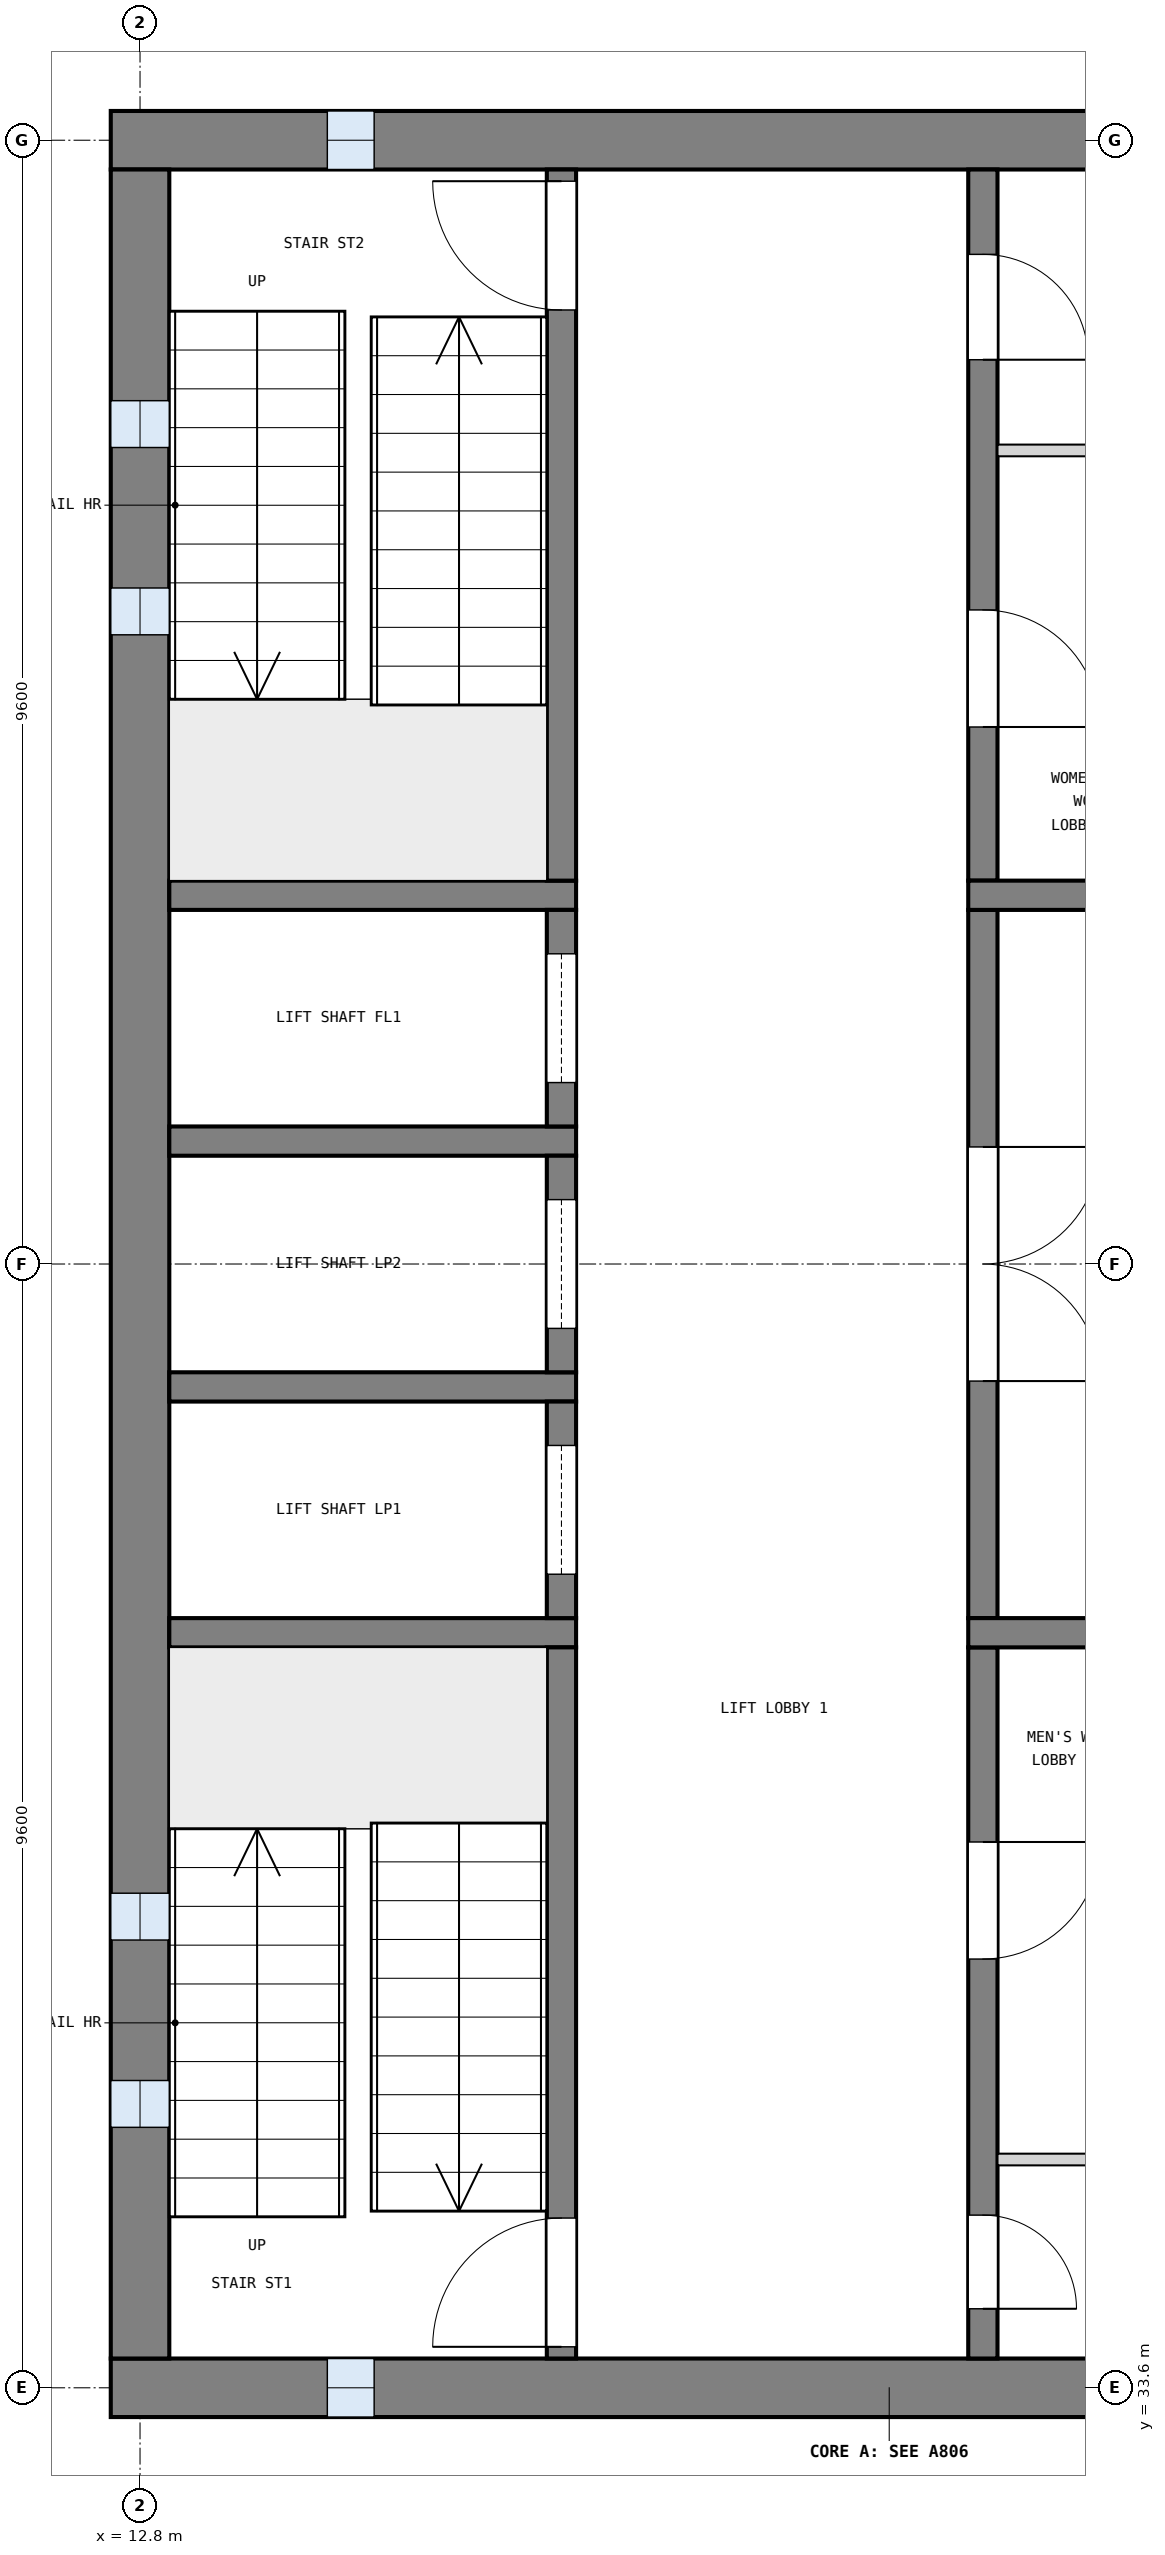
"""IFC4 building model, lengths in metres.
Left out: names, types, materials, properties, quantities, classifications, styles, units other than length and angle.
Written with IfcOpenShell. Run it as: python <this file> out.ifc"""

import sys

from ifc_helpers import new_model, si_unit, direction, frame, frame_2d, origin, place, context, subcontext, project, spatial, rectangle, extrude, element, fill, save


model = new_model("IFC4")
c1 = context("Model", 3, precision=1e-05, world=origin(), true_north=direction((0.0, 1.0)))
c2 = subcontext(c1, "Body", "Model", "MODEL_VIEW")
j1 = project(units=[si_unit("LENGTHUNIT", "METRE"), si_unit("PLANEANGLEUNIT", "RADIAN")], contexts=[c1])
p1 = place(None, origin())
s1 = spatial("IfcSite", under=j1, at=p1, CompositionType="ELEMENT")
p2 = place(p1, origin())
s2 = spatial("IfcBuilding", under=s1, at=p2, CompositionType="ELEMENT")
p3 = place(p2, frame((0.0, 0.0, 17.1)))
s3 = spatial("IfcBuildingStorey", under=s2, at=p3, CompositionType="ELEMENT", Elevation=17.1)
p4 = place(p3, frame((12.55, 52.8, 0.0), z_axis=(0.0, 0.0, 1.0), x_axis=(1.0, 0.0, 0.0)))
e1 = element("IfcWall", 1, at=p4, inside=s3, PredefinedType="SHEAR", context=c2, shape_type="SweptSolid", body=[
    extrude(rectangle(XDim=13.3, YDim=0.5, at=frame_2d((6.65, 0.0))), origin(), (0.0, 0.0, 1.0), 3.9),
])
p5 = place(p4, frame((1.85, 0.0, 1.0)))
e2 = element("IfcOpeningElement", 2, at=p5, cuts=e1, PredefinedType="OPENING", context=c2, shape_type="SweptSolid", body=[
    extrude(rectangle(XDim=0.4, YDim=2.0, at=frame_2d((0.2, 1.0))), frame((0.0, 0.26, 0.0), z_axis=(0.0, -1.0, 0.0), x_axis=(1.0, 0.0, 0.0)), (0.0, 0.0, 1.0), 0.52),
])
p6 = place(p3, frame((12.55, 33.6, 0.0), z_axis=(0.0, 0.0, 1.0), x_axis=(1.0, 0.0, 0.0)))
e3 = element("IfcWall", 3, at=p6, inside=s3, PredefinedType="SHEAR", context=c2, shape_type="SweptSolid", body=[
    extrude(rectangle(XDim=13.3, YDim=0.5, at=frame_2d((6.65, 0.0))), origin(), (0.0, 0.0, 1.0), 3.9),
])
p7 = place(p6, frame((1.85, 0.0, 1.0)))
e4 = element("IfcOpeningElement", 4, at=p7, cuts=e3, PredefinedType="OPENING", context=c2, shape_type="SweptSolid", body=[
    extrude(rectangle(XDim=0.4, YDim=2.0, at=frame_2d((0.2, 1.0))), frame((0.0, 0.26, 0.0), z_axis=(0.0, -1.0, 0.0), x_axis=(1.0, 0.0, 0.0)), (0.0, 0.0, 1.0), 0.52),
])
p8 = place(p3, frame((12.8, 33.85, 0.0), z_axis=(0.0, 0.0, 1.0), x_axis=(0.0, 1.0, 0.0)))
e5 = element("IfcWall", 5, at=p8, inside=s3, PredefinedType="SHEAR", context=c2, shape_type="SweptSolid", body=[
    extrude(rectangle(XDim=18.7, YDim=0.5, at=frame_2d((9.35, 0.0))), origin(), (0.0, 0.0, 1.0), 3.9),
])
p9 = place(p8, frame((1.975, 0.0, 1.0)))
e6 = element("IfcOpeningElement", 6, at=p9, cuts=e5, PredefinedType="OPENING", context=c2, shape_type="SweptSolid", body=[
    extrude(rectangle(XDim=0.4, YDim=2.0, at=frame_2d((0.2, 1.0))), frame((0.0, 0.26, 0.0), z_axis=(0.0, -1.0, 0.0), x_axis=(1.0, 0.0, 0.0)), (0.0, 0.0, 1.0), 0.52),
])
p10 = place(p8, frame((3.575, 0.0, 1.0)))
e7 = element("IfcOpeningElement", 7, at=p10, cuts=e5, PredefinedType="OPENING", context=c2, shape_type="SweptSolid", body=[
    extrude(rectangle(XDim=0.4, YDim=2.0, at=frame_2d((0.2, 1.0))), frame((0.0, 0.26, 0.0), z_axis=(0.0, -1.0, 0.0), x_axis=(1.0, 0.0, 0.0)), (0.0, 0.0, 1.0), 0.52),
])
p11 = place(p8, frame((14.725, 0.0, 1.0)))
e8 = element("IfcOpeningElement", 8, at=p11, cuts=e5, PredefinedType="OPENING", context=c2, shape_type="SweptSolid", body=[
    extrude(rectangle(XDim=0.4, YDim=2.0, at=frame_2d((0.2, 1.0))), frame((0.0, 0.26, 0.0), z_axis=(0.0, -1.0, 0.0), x_axis=(1.0, 0.0, 0.0)), (0.0, 0.0, 1.0), 0.52),
])
p12 = place(p8, frame((16.325, 0.0, 1.0)))
e9 = element("IfcOpeningElement", 9, at=p12, cuts=e5, PredefinedType="OPENING", context=c2, shape_type="SweptSolid", body=[
    extrude(rectangle(XDim=0.4, YDim=2.0, at=frame_2d((0.2, 1.0))), frame((0.0, 0.26, 0.0), z_axis=(0.0, -1.0, 0.0), x_axis=(1.0, 0.0, 0.0)), (0.0, 0.0, 1.0), 0.52),
])
for number, where, z_axis, x_axis in (
    (10, (13.05, 40.05, 0.0), (0.0, 0.0, 1.0), (1.0, 0.0, 0.0)),
    (11, (13.05, 42.15, 0.0), (0.0, 0.0, 1.0), (1.0, 0.0, 0.0)),
    (12, (13.05, 44.25, 0.0), (0.0, 0.0, 1.0), (1.0, 0.0, 0.0)),
    (13, (13.05, 46.35, 0.0), (0.0, 0.0, 1.0), (1.0, 0.0, 0.0)),
):
    element("IfcWall", number, at=place(p3, frame(where, z_axis=z_axis, x_axis=x_axis)), inside=s3, PredefinedType="SOLIDWALL", context=c2, shape_type="SweptSolid", body=[
        extrude(rectangle(XDim=3.475, YDim=0.25, at=frame_2d((1.737, 0.0))), origin(), (0.0, 0.0, 1.0), 3.6),
    ])
p13 = place(p3, frame((16.4, 33.85, 0.0), z_axis=(0.0, 0.0, 1.0), x_axis=(0.0, 1.0, 0.0)))
e14 = element("IfcWall", 14, at=p13, inside=s3, PredefinedType="SOLIDWALL", context=c2, shape_type="SweptSolid", body=[
    extrude(rectangle(XDim=6.075, YDim=0.25, at=frame_2d((3.038, 0.0))), origin(), (0.0, 0.0, 1.0), 3.6),
])
p14 = place(p13, frame((0.1, 0.0, 0.0)))
e15 = element("IfcOpeningElement", 15, at=p14, cuts=e14, PredefinedType="OPENING", context=c2, shape_type="SweptSolid", body=[
    extrude(rectangle(XDim=1.1, YDim=2.1, at=frame_2d((0.55, 1.05))), frame((0.0, 0.135, 0.0), z_axis=(0.0, -1.0, 0.0), x_axis=(1.0, 0.0, 0.0)), (0.0, 0.0, 1.0), 0.27),
])
p15 = place(p3, frame((16.4, 40.175, 0.0), z_axis=(0.0, 0.0, 1.0), x_axis=(0.0, 1.0, 0.0)))
e16 = element("IfcWall", 16, at=p15, inside=s3, PredefinedType="SOLIDWALL", context=c2, shape_type="SweptSolid", body=[
    extrude(rectangle(XDim=1.85, YDim=0.25, at=frame_2d((0.925, 0.0))), origin(), (0.0, 0.0, 1.0), 3.6),
])
p16 = place(p15, frame((0.375, 0.0, 0.0)))
e17 = element("IfcOpeningElement", 17, at=p16, cuts=e16, PredefinedType="OPENING", context=c2, shape_type="SweptSolid", body=[
    extrude(rectangle(XDim=1.1, YDim=2.1, at=frame_2d((0.55, 1.05))), frame((0.0, 0.135, 0.0), z_axis=(0.0, -1.0, 0.0), x_axis=(1.0, 0.0, 0.0)), (0.0, 0.0, 1.0), 0.27),
])
p17 = place(p3, frame((16.4, 42.275, 0.0), z_axis=(0.0, 0.0, 1.0), x_axis=(0.0, 1.0, 0.0)))
e18 = element("IfcWall", 18, at=p17, inside=s3, PredefinedType="SOLIDWALL", context=c2, shape_type="SweptSolid", body=[
    extrude(rectangle(XDim=1.85, YDim=0.25, at=frame_2d((0.925, 0.0))), origin(), (0.0, 0.0, 1.0), 3.6),
])
p18 = place(p17, frame((0.375, 0.0, 0.0)))
e19 = element("IfcOpeningElement", 19, at=p18, cuts=e18, PredefinedType="OPENING", context=c2, shape_type="SweptSolid", body=[
    extrude(rectangle(XDim=1.1, YDim=2.1, at=frame_2d((0.55, 1.05))), frame((0.0, 0.135, 0.0), z_axis=(0.0, -1.0, 0.0), x_axis=(1.0, 0.0, 0.0)), (0.0, 0.0, 1.0), 0.27),
])
p19 = place(p3, frame((16.4, 44.375, 0.0), z_axis=(0.0, 0.0, 1.0), x_axis=(0.0, 1.0, 0.0)))
e20 = element("IfcWall", 20, at=p19, inside=s3, PredefinedType="SOLIDWALL", context=c2, shape_type="SweptSolid", body=[
    extrude(rectangle(XDim=1.85, YDim=0.25, at=frame_2d((0.925, 0.0))), origin(), (0.0, 0.0, 1.0), 3.6),
])
p20 = place(p19, frame((0.375, 0.0, 0.0)))
e21 = element("IfcOpeningElement", 21, at=p20, cuts=e20, PredefinedType="OPENING", context=c2, shape_type="SweptSolid", body=[
    extrude(rectangle(XDim=1.1, YDim=2.1, at=frame_2d((0.55, 1.05))), frame((0.0, 0.135, 0.0), z_axis=(0.0, -1.0, 0.0), x_axis=(1.0, 0.0, 0.0)), (0.0, 0.0, 1.0), 0.27),
])
p21 = place(p3, frame((16.4, 46.475, 0.0), z_axis=(0.0, 0.0, 1.0), x_axis=(0.0, 1.0, 0.0)))
e22 = element("IfcWall", 22, at=p21, inside=s3, PredefinedType="SOLIDWALL", context=c2, shape_type="SweptSolid", body=[
    extrude(rectangle(XDim=6.075, YDim=0.25, at=frame_2d((3.038, 0.0))), origin(), (0.0, 0.0, 1.0), 3.6),
])
p22 = place(p21, frame((4.875, 0.0, 0.0)))
e23 = element("IfcOpeningElement", 23, at=p22, cuts=e22, PredefinedType="OPENING", context=c2, shape_type="SweptSolid", body=[
    extrude(rectangle(XDim=1.1, YDim=2.1, at=frame_2d((0.55, 1.05))), frame((0.0, 0.135, 0.0), z_axis=(0.0, -1.0, 0.0), x_axis=(1.0, 0.0, 0.0)), (0.0, 0.0, 1.0), 0.27),
])
p23 = place(p3, frame((20.0, 33.85, 0.0), z_axis=(0.0, 0.0, 1.0), x_axis=(0.0, 1.0, 0.0)))
e24 = element("IfcWall", 24, at=p23, inside=s3, PredefinedType="SOLIDWALL", context=c2, shape_type="SweptSolid", body=[
    extrude(rectangle(XDim=6.075, YDim=0.25, at=frame_2d((3.038, 0.0))), origin(), (0.0, 0.0, 1.0), 3.6),
])
p24 = place(p23, frame((0.425, 0.0, 0.0)))
e25 = element("IfcOpeningElement", 25, at=p24, cuts=e24, PredefinedType="OPENING", context=c2, shape_type="SweptSolid", body=[
    extrude(rectangle(XDim=0.8, YDim=2.1, at=frame_2d((0.4, 1.05))), frame((0.0, 0.135, 0.0), z_axis=(0.0, -1.0, 0.0), x_axis=(1.0, 0.0, 0.0)), (0.0, 0.0, 1.0), 0.27),
])
p25 = place(p23, frame((3.413, 0.0, 0.0)))
e26 = element("IfcOpeningElement", 26, at=p25, cuts=e24, PredefinedType="OPENING", context=c2, shape_type="SweptSolid", body=[
    extrude(rectangle(XDim=1.0, YDim=2.1, at=frame_2d((0.5, 1.05))), frame((0.0, 0.135, 0.0), z_axis=(0.0, -1.0, 0.0), x_axis=(1.0, 0.0, 0.0)), (0.0, 0.0, 1.0), 0.27),
])
p26 = place(p3, frame((20.0, 40.175, 0.0), z_axis=(0.0, 0.0, 1.0), x_axis=(0.0, 1.0, 0.0)))
e27 = element("IfcWall", 27, at=p26, inside=s3, PredefinedType="SOLIDWALL", context=c2, shape_type="SweptSolid", body=[
    extrude(rectangle(XDim=6.05, YDim=0.25, at=frame_2d((3.025, 0.0))), origin(), (0.0, 0.0, 1.0), 3.6),
])
p27 = place(p26, frame((2.025, 0.0, 0.0)))
e28 = element("IfcOpeningElement", 28, at=p27, cuts=e27, PredefinedType="OPENING", context=c2, shape_type="SweptSolid", body=[
    extrude(rectangle(XDim=2.0, YDim=2.1, at=frame_2d((1.0, 1.05))), frame((0.0, 0.135, 0.0), z_axis=(0.0, -1.0, 0.0), x_axis=(1.0, 0.0, 0.0)), (0.0, 0.0, 1.0), 0.27),
])
p28 = place(p3, frame((20.0, 46.475, 0.0), z_axis=(0.0, 0.0, 1.0), x_axis=(0.0, 1.0, 0.0)))
e29 = element("IfcWall", 29, at=p28, inside=s3, PredefinedType="SOLIDWALL", context=c2, shape_type="SweptSolid", body=[
    extrude(rectangle(XDim=6.075, YDim=0.25, at=frame_2d((3.038, 0.0))), origin(), (0.0, 0.0, 1.0), 3.6),
])
p29 = place(p28, frame((1.312, 0.0, 0.0)))
e30 = element("IfcOpeningElement", 30, at=p29, cuts=e29, PredefinedType="OPENING", context=c2, shape_type="SweptSolid", body=[
    extrude(rectangle(XDim=1.0, YDim=2.1, at=frame_2d((0.5, 1.05))), frame((0.0, 0.135, 0.0), z_axis=(0.0, -1.0, 0.0), x_axis=(1.0, 0.0, 0.0)), (0.0, 0.0, 1.0), 0.27),
])
p30 = place(p28, frame((4.45, 0.0, 0.0)))
e31 = element("IfcOpeningElement", 31, at=p30, cuts=e29, PredefinedType="OPENING", context=c2, shape_type="SweptSolid", body=[
    extrude(rectangle(XDim=0.9, YDim=2.1, at=frame_2d((0.45, 1.05))), frame((0.0, 0.135, 0.0), z_axis=(0.0, -1.0, 0.0), x_axis=(1.0, 0.0, 0.0)), (0.0, 0.0, 1.0), 0.27),
])
for number, where, z_axis, x_axis in (
    (32, (19.875, 40.05, 0.0), (0.0, 0.0, 1.0), (1.0, 0.0, 0.0)),
    (33, (19.875, 46.35, 0.0), (0.0, 0.0, 1.0), (1.0, 0.0, 0.0)),
):
    element("IfcWall", number, at=place(p3, frame(where, z_axis=z_axis, x_axis=x_axis)), inside=s3, PredefinedType="SOLIDWALL", context=c2, shape_type="SweptSolid", body=[
        extrude(rectangle(XDim=5.475, YDim=0.25, at=frame_2d((2.738, 0.0))), origin(), (0.0, 0.0, 1.0), 3.6),
    ])
for number, where, z_axis, x_axis in (
    (34, (20.125, 35.55, 0.0), (0.0, 0.0, 1.0), (1.0, 0.0, 0.0)),
    (35, (20.125, 50.15, 0.0), (0.0, 0.0, 1.0), (1.0, 0.0, 0.0)),
):
    element("IfcWall", number, at=place(p3, frame(where, z_axis=z_axis, x_axis=x_axis)), inside=s3, PredefinedType="PARTITIONING", context=c2, shape_type="SweptSolid", body=[
        extrude(rectangle(XDim=5.225, YDim=0.1, at=frame_2d((2.613, 0.0))), origin(), (0.0, 0.0, 1.0), 3.6),
    ])
p31 = place(p9, origin())
e36 = element("IfcWindow", 36, at=p31, inside=s3, PartitioningType="SINGLE_PANEL", PredefinedType="WINDOW", context=c2, shape_type="SweptSolid", body=[
    extrude(rectangle(XDim=0.4, YDim=2.0, at=frame_2d((0.2, 1.0))), frame((0.0, 0.03, 0.0), z_axis=(0.0, -1.0, 0.0), x_axis=(1.0, 0.0, 0.0)), (0.0, 0.0, 1.0), 0.06),
])
fill(e6, e36)
p32 = place(p10, origin())
e37 = element("IfcWindow", 37, at=p32, inside=s3, PartitioningType="SINGLE_PANEL", PredefinedType="WINDOW", context=c2, shape_type="SweptSolid", body=[
    extrude(rectangle(XDim=0.4, YDim=2.0, at=frame_2d((0.2, 1.0))), frame((0.0, 0.03, 0.0), z_axis=(0.0, -1.0, 0.0), x_axis=(1.0, 0.0, 0.0)), (0.0, 0.0, 1.0), 0.06),
])
fill(e7, e37)
p33 = place(p11, origin())
e38 = element("IfcWindow", 38, at=p33, inside=s3, PartitioningType="SINGLE_PANEL", PredefinedType="WINDOW", context=c2, shape_type="SweptSolid", body=[
    extrude(rectangle(XDim=0.4, YDim=2.0, at=frame_2d((0.2, 1.0))), frame((0.0, 0.03, 0.0), z_axis=(0.0, -1.0, 0.0), x_axis=(1.0, 0.0, 0.0)), (0.0, 0.0, 1.0), 0.06),
])
fill(e8, e38)
p34 = place(p12, origin())
e39 = element("IfcWindow", 39, at=p34, inside=s3, PartitioningType="SINGLE_PANEL", PredefinedType="WINDOW", context=c2, shape_type="SweptSolid", body=[
    extrude(rectangle(XDim=0.4, YDim=2.0, at=frame_2d((0.2, 1.0))), frame((0.0, 0.03, 0.0), z_axis=(0.0, -1.0, 0.0), x_axis=(1.0, 0.0, 0.0)), (0.0, 0.0, 1.0), 0.06),
])
fill(e9, e39)
p35 = place(p7, origin())
e40 = element("IfcWindow", 40, at=p35, inside=s3, PartitioningType="SINGLE_PANEL", PredefinedType="WINDOW", context=c2, shape_type="SweptSolid", body=[
    extrude(rectangle(XDim=0.4, YDim=2.0, at=frame_2d((0.2, 1.0))), frame((0.0, 0.03, 0.0), z_axis=(0.0, -1.0, 0.0), x_axis=(1.0, 0.0, 0.0)), (0.0, 0.0, 1.0), 0.06),
])
fill(e4, e40)
p36 = place(p5, origin())
e41 = element("IfcWindow", 41, at=p36, inside=s3, PartitioningType="SINGLE_PANEL", PredefinedType="WINDOW", context=c2, shape_type="SweptSolid", body=[
    extrude(rectangle(XDim=0.4, YDim=2.0, at=frame_2d((0.2, 1.0))), frame((0.0, 0.03, 0.0), z_axis=(0.0, -1.0, 0.0), x_axis=(1.0, 0.0, 0.0)), (0.0, 0.0, 1.0), 0.06),
])
fill(e2, e41)
p37 = place(p14, origin())
e42 = element("IfcDoor", 42, at=p37, inside=s3, OperationType="SINGLE_SWING_LEFT", PredefinedType="DOOR", context=c2, shape_type="SweptSolid", body=[
    extrude(rectangle(XDim=1.1, YDim=2.1, at=frame_2d((0.55, 1.05))), frame((0.0, 0.025, 0.0), z_axis=(0.0, -1.0, 0.0), x_axis=(1.0, 0.0, 0.0)), (0.0, 0.0, 1.0), 0.05),
])
fill(e15, e42)
p38 = place(p22, origin())
e43 = element("IfcDoor", 43, at=p38, inside=s3, OperationType="SINGLE_SWING_RIGHT", PredefinedType="DOOR", context=c2, shape_type="SweptSolid", body=[
    extrude(rectangle(XDim=1.1, YDim=2.1, at=frame_2d((0.55, 1.05))), frame((0.0, 0.025, 0.0), z_axis=(0.0, -1.0, 0.0), x_axis=(1.0, 0.0, 0.0)), (0.0, 0.0, 1.0), 0.05),
])
fill(e23, e43)
p39 = place(p16, origin())
e44 = element("IfcDoor", 44, at=p39, inside=s3, OperationType="SLIDING_TO_LEFT", PredefinedType="DOOR", context=c2, shape_type="SweptSolid", body=[
    extrude(rectangle(XDim=1.1, YDim=2.1, at=frame_2d((0.55, 1.05))), frame((0.0, 0.025, 0.0), z_axis=(0.0, -1.0, 0.0), x_axis=(1.0, 0.0, 0.0)), (0.0, 0.0, 1.0), 0.05),
])
fill(e17, e44)
p40 = place(p18, origin())
e45 = element("IfcDoor", 45, at=p40, inside=s3, OperationType="SLIDING_TO_LEFT", PredefinedType="DOOR", context=c2, shape_type="SweptSolid", body=[
    extrude(rectangle(XDim=1.1, YDim=2.1, at=frame_2d((0.55, 1.05))), frame((0.0, 0.025, 0.0), z_axis=(0.0, -1.0, 0.0), x_axis=(1.0, 0.0, 0.0)), (0.0, 0.0, 1.0), 0.05),
])
fill(e19, e45)
p41 = place(p20, origin())
e46 = element("IfcDoor", 46, at=p41, inside=s3, OperationType="SLIDING_TO_LEFT", PredefinedType="DOOR", context=c2, shape_type="SweptSolid", body=[
    extrude(rectangle(XDim=1.1, YDim=2.1, at=frame_2d((0.55, 1.05))), frame((0.0, 0.025, 0.0), z_axis=(0.0, -1.0, 0.0), x_axis=(1.0, 0.0, 0.0)), (0.0, 0.0, 1.0), 0.05),
])
fill(e21, e46)
p42 = place(p27, frame((2.0, 0.0, 0.0), z_axis=(0.0, 0.0, 1.0), x_axis=(-1.0, 0.0, 0.0)))
e47 = element("IfcDoor", 47, at=p42, inside=s3, OperationType="DOUBLE_DOOR_SINGLE_SWING", PredefinedType="DOOR", context=c2, shape_type="SweptSolid", body=[
    extrude(rectangle(XDim=2.0, YDim=2.1, at=frame_2d((1.0, 1.05))), frame((0.0, 0.025, 0.0), z_axis=(0.0, -1.0, 0.0), x_axis=(1.0, 0.0, 0.0)), (0.0, 0.0, 1.0), 0.05),
])
fill(e28, e47)
p43 = place(p24, frame((0.8, 0.0, 0.0), z_axis=(0.0, 0.0, 1.0), x_axis=(-1.0, 0.0, 0.0)))
e48 = element("IfcDoor", 48, at=p43, inside=s3, OperationType="SINGLE_SWING_RIGHT", PredefinedType="DOOR", context=c2, shape_type="SweptSolid", body=[
    extrude(rectangle(XDim=0.8, YDim=2.1, at=frame_2d((0.4, 1.05))), frame((0.0, 0.025, 0.0), z_axis=(0.0, -1.0, 0.0), x_axis=(1.0, 0.0, 0.0)), (0.0, 0.0, 1.0), 0.05),
])
fill(e25, e48)
p44 = place(p25, frame((1.0, 0.0, 0.0), z_axis=(0.0, 0.0, 1.0), x_axis=(-1.0, 0.0, 0.0)))
e49 = element("IfcDoor", 49, at=p44, inside=s3, OperationType="SINGLE_SWING_LEFT", PredefinedType="DOOR", context=c2, shape_type="SweptSolid", body=[
    extrude(rectangle(XDim=1.0, YDim=2.1, at=frame_2d((0.5, 1.05))), frame((0.0, 0.025, 0.0), z_axis=(0.0, -1.0, 0.0), x_axis=(1.0, 0.0, 0.0)), (0.0, 0.0, 1.0), 0.05),
])
fill(e26, e49)
p45 = place(p29, frame((1.0, 0.0, 0.0), z_axis=(0.0, 0.0, 1.0), x_axis=(-1.0, 0.0, 0.0)))
e50 = element("IfcDoor", 50, at=p45, inside=s3, OperationType="SINGLE_SWING_RIGHT", PredefinedType="DOOR", context=c2, shape_type="SweptSolid", body=[
    extrude(rectangle(XDim=1.0, YDim=2.1, at=frame_2d((0.5, 1.05))), frame((0.0, 0.025, 0.0), z_axis=(0.0, -1.0, 0.0), x_axis=(1.0, 0.0, 0.0)), (0.0, 0.0, 1.0), 0.05),
])
fill(e30, e50)
p46 = place(p30, frame((0.9, 0.0, 0.0), z_axis=(0.0, 0.0, 1.0), x_axis=(-1.0, 0.0, 0.0)))
e51 = element("IfcDoor", 51, at=p46, inside=s3, OperationType="SINGLE_SWING_RIGHT", PredefinedType="DOOR", context=c2, shape_type="SweptSolid", body=[
    extrude(rectangle(XDim=0.9, YDim=2.1, at=frame_2d((0.45, 1.05))), frame((0.0, 0.025, 0.0), z_axis=(0.0, -1.0, 0.0), x_axis=(1.0, 0.0, 0.0)), (0.0, 0.0, 1.0), 0.05),
])
fill(e31, e51)
save(model, sys.argv[1])
